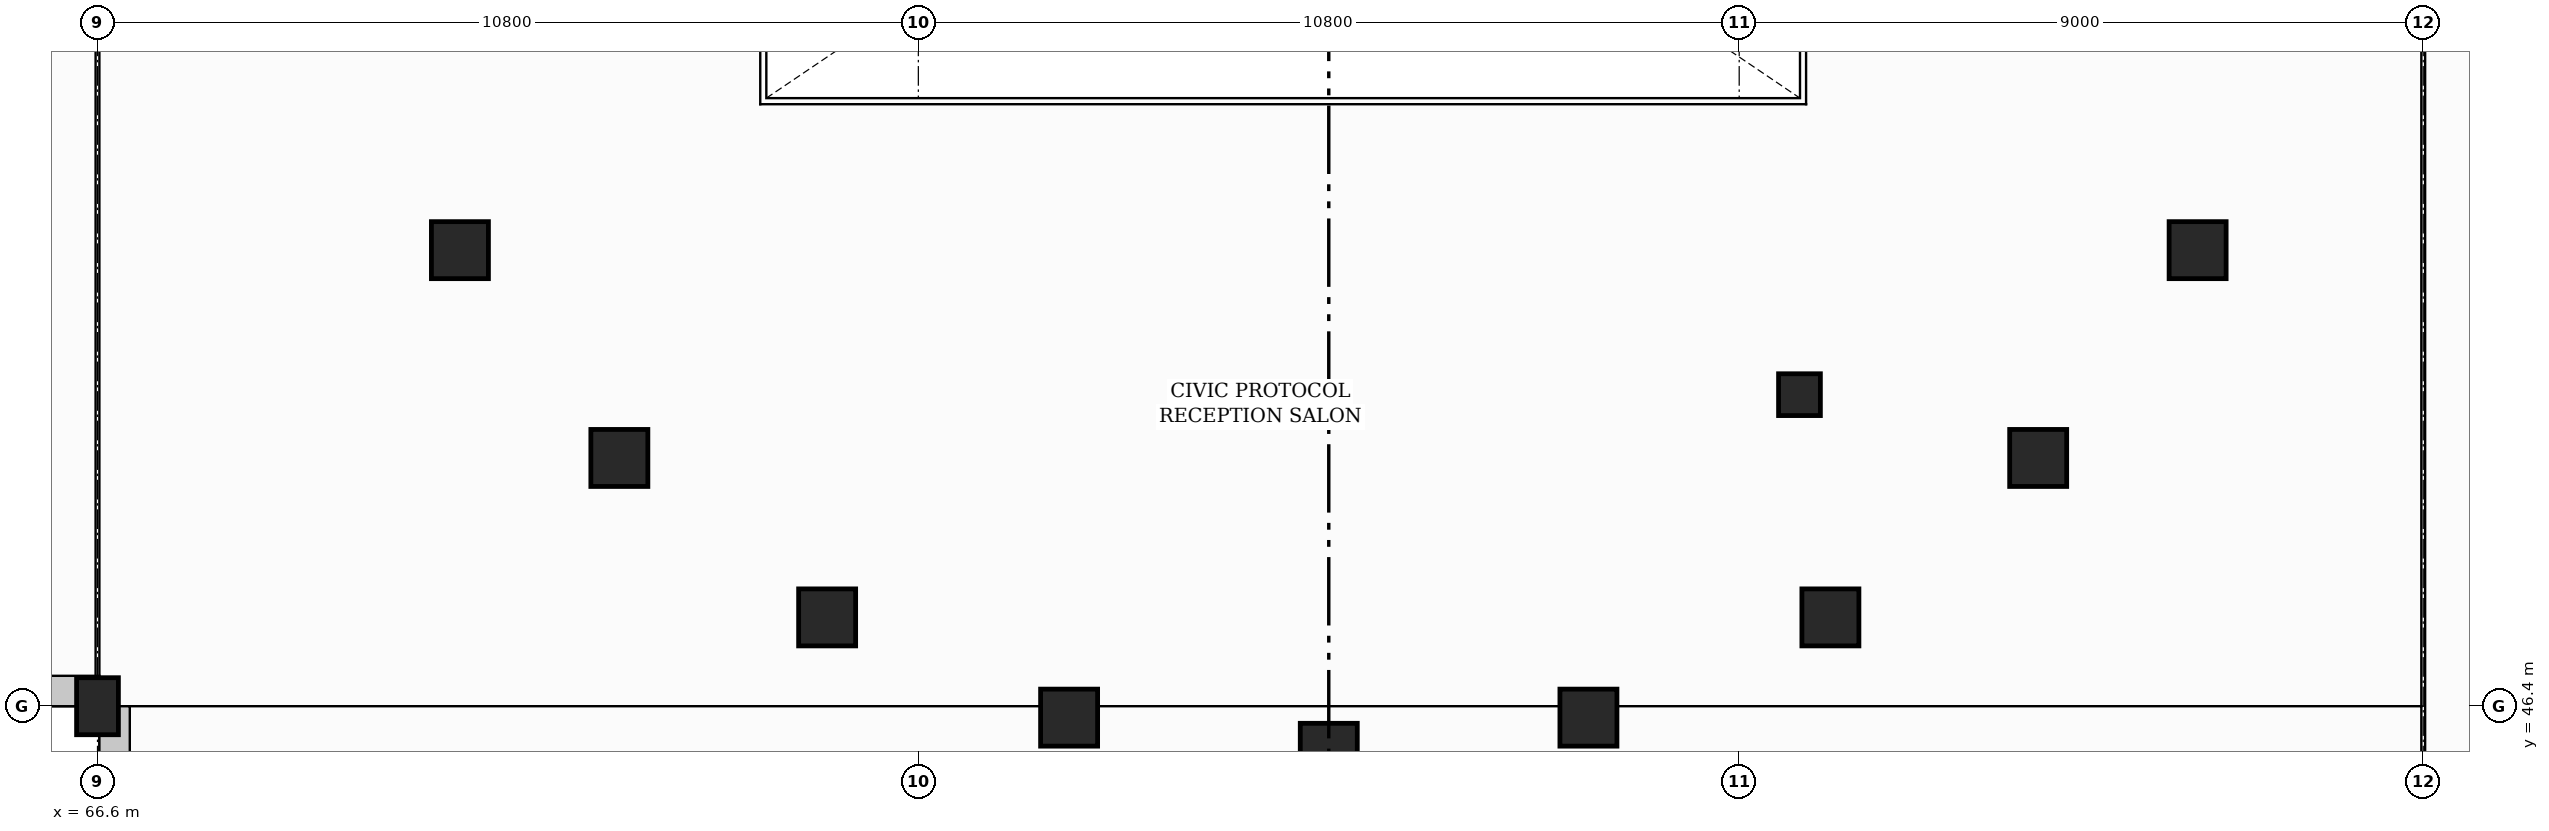
"""IFC4 building model, lengths in metres.
Left out: names, types, materials, properties, quantities, classifications, styles, units other than length and angle.
Written with IfcOpenShell. Run it as: python <this file> out.ifc"""

import sys

from ifc_helpers import new_model, si_unit, direction, frame, frame_2d, origin, origin_2d, place, context, subcontext, project, spatial, rectangle, circle, extrude, element, save


model = new_model("IFC4")
c1 = context("Model", 3, precision=1e-05, world=origin(), true_north=direction((0.0, 1.0)))
c2 = subcontext(c1, "Body", "Model", "MODEL_VIEW")
j1 = project(units=[si_unit("LENGTHUNIT", "METRE"), si_unit("PLANEANGLEUNIT", "RADIAN")], contexts=[c1])
p1 = place(None, origin())
s1 = spatial("IfcSite", under=j1, at=p1, CompositionType="ELEMENT")
p2 = place(p1, origin())
s2 = spatial("IfcBuilding", under=s1, at=p2, CompositionType="ELEMENT")
p3 = place(p2, frame((0.0, 0.0, 5.1)))
s3 = spatial("IfcBuildingStorey", under=s2, at=p3, CompositionType="ELEMENT", Elevation=5.1)
for number, where, z_axis, x_axis in (
    (1, (71.368, 52.4, 0.0), (0.0, 0.0, 1.0), (1.0, 0.0, 0.0)),
    (2, (73.466, 49.666, 0.0), (0.0, 0.0, 1.0), (1.0, 0.0, 0.0)),
    (3, (76.2, 47.569, 0.0), (0.0, 0.0, 1.0), (1.0, 0.0, 0.0)),
    (4, (79.384, 46.25, 0.0), (0.0, 0.0, 1.0), (1.0, 0.0, 0.0)),
    (5, (82.8, 45.8, 0.0), (0.0, 0.0, 1.0), (1.0, 0.0, 0.0)),
    (6, (86.216, 46.25, 0.0), (0.0, 0.0, 1.0), (1.0, 0.0, 0.0)),
    (7, (89.4, 47.569, 0.0), (0.0, 0.0, 1.0), (1.0, 0.0, 0.0)),
    (8, (92.134, 49.666, 0.0), (0.0, 0.0, 1.0), (1.0, 0.0, 0.0)),
    (9, (94.231, 52.4, 0.0), (0.0, 0.0, 1.0), (1.0, 0.0, 0.0)),
):
    element("IfcColumn", number, at=place(p3, frame(where, z_axis=z_axis, x_axis=x_axis)), inside=s3, PredefinedType="COLUMN", context=c2, shape_type="SweptSolid", body=[
        extrude(circle(Radius=0.375, at=origin_2d()), origin(), (0.0, 0.0, 1.0), 4.5),
    ])
p4 = place(p3, frame((88.993, 50.499, 0.0), z_axis=(0.0, 0.0, 1.0), x_axis=(1.0, 0.0, 0.0)))
e10 = element("IfcColumn", 10, at=p4, inside=s3, PredefinedType="COLUMN", context=c2, shape_type="SweptSolid", body=[
    extrude(circle(Radius=0.275, at=origin_2d()), origin(), (0.0, 0.0, 1.0), 4.5),
])
p5 = place(p3, frame((66.6, 46.4, 0.0), z_axis=(0.0, 0.0, 1.0), x_axis=(1.0, 0.0, 0.0)))
e11 = element("IfcColumn", 11, at=p5, inside=s3, PredefinedType="COLUMN", context=c2, shape_type="SweptSolid", body=[
    extrude(rectangle(XDim=0.55, YDim=0.75, at=origin_2d()), origin(), (0.0, 0.0, 1.0), 4.5),
])
p6 = place(p3, frame((66.825, 39.2, 0.0), z_axis=(0.0, 0.0, 1.0), x_axis=(0.0, 1.0, 0.0)))
e12 = element("IfcWall", 12, at=p6, inside=s3, PredefinedType="SOLIDWALL", context=c2, shape_type="SweptSolid", body=[
    extrude(rectangle(XDim=7.2, YDim=0.4, at=frame_2d((3.6, 0.0))), origin(), (0.0, 0.0, 1.0), 3.54),
])
p7 = place(p3, frame((66.625, 46.6, 0.0), z_axis=(0.0, 0.0, 1.0), x_axis=(-1.0, 0.0, 0.0)))
e13 = element("IfcWall", 13, at=p7, inside=s3, PredefinedType="SOLIDWALL", context=c2, shape_type="SweptSolid", body=[
    extrude(rectangle(XDim=9.025, YDim=0.4, at=frame_2d((4.512, 0.0))), origin(), (0.0, 0.0, 1.0), 3.46),
])
p8 = place(p7, frame((1.427, 0.0, 0.85)))
e14 = element("IfcOpeningElement", 14, at=p8, cuts=e13, PredefinedType="OPENING", context=c2, shape_type="SweptSolid", body=[
    extrude(rectangle(XDim=2.2, YDim=2.4, at=frame_2d((1.1, 1.2))), frame((0.0, 0.21, 0.0), z_axis=(0.0, -1.0, 0.0), x_axis=(1.0, 0.0, 0.0)), (0.0, 0.0, 1.0), 0.42),
])
p9 = place(p7, frame((5.398, 0.0, 0.85)))
e15 = element("IfcOpeningElement", 15, at=p9, cuts=e13, PredefinedType="OPENING", context=c2, shape_type="SweptSolid", body=[
    extrude(rectangle(XDim=2.2, YDim=2.4, at=frame_2d((1.1, 1.2))), frame((0.0, 0.21, 0.0), z_axis=(0.0, -1.0, 0.0), x_axis=(1.0, 0.0, 0.0)), (0.0, 0.0, 1.0), 0.42),
])
save(model, sys.argv[1])
